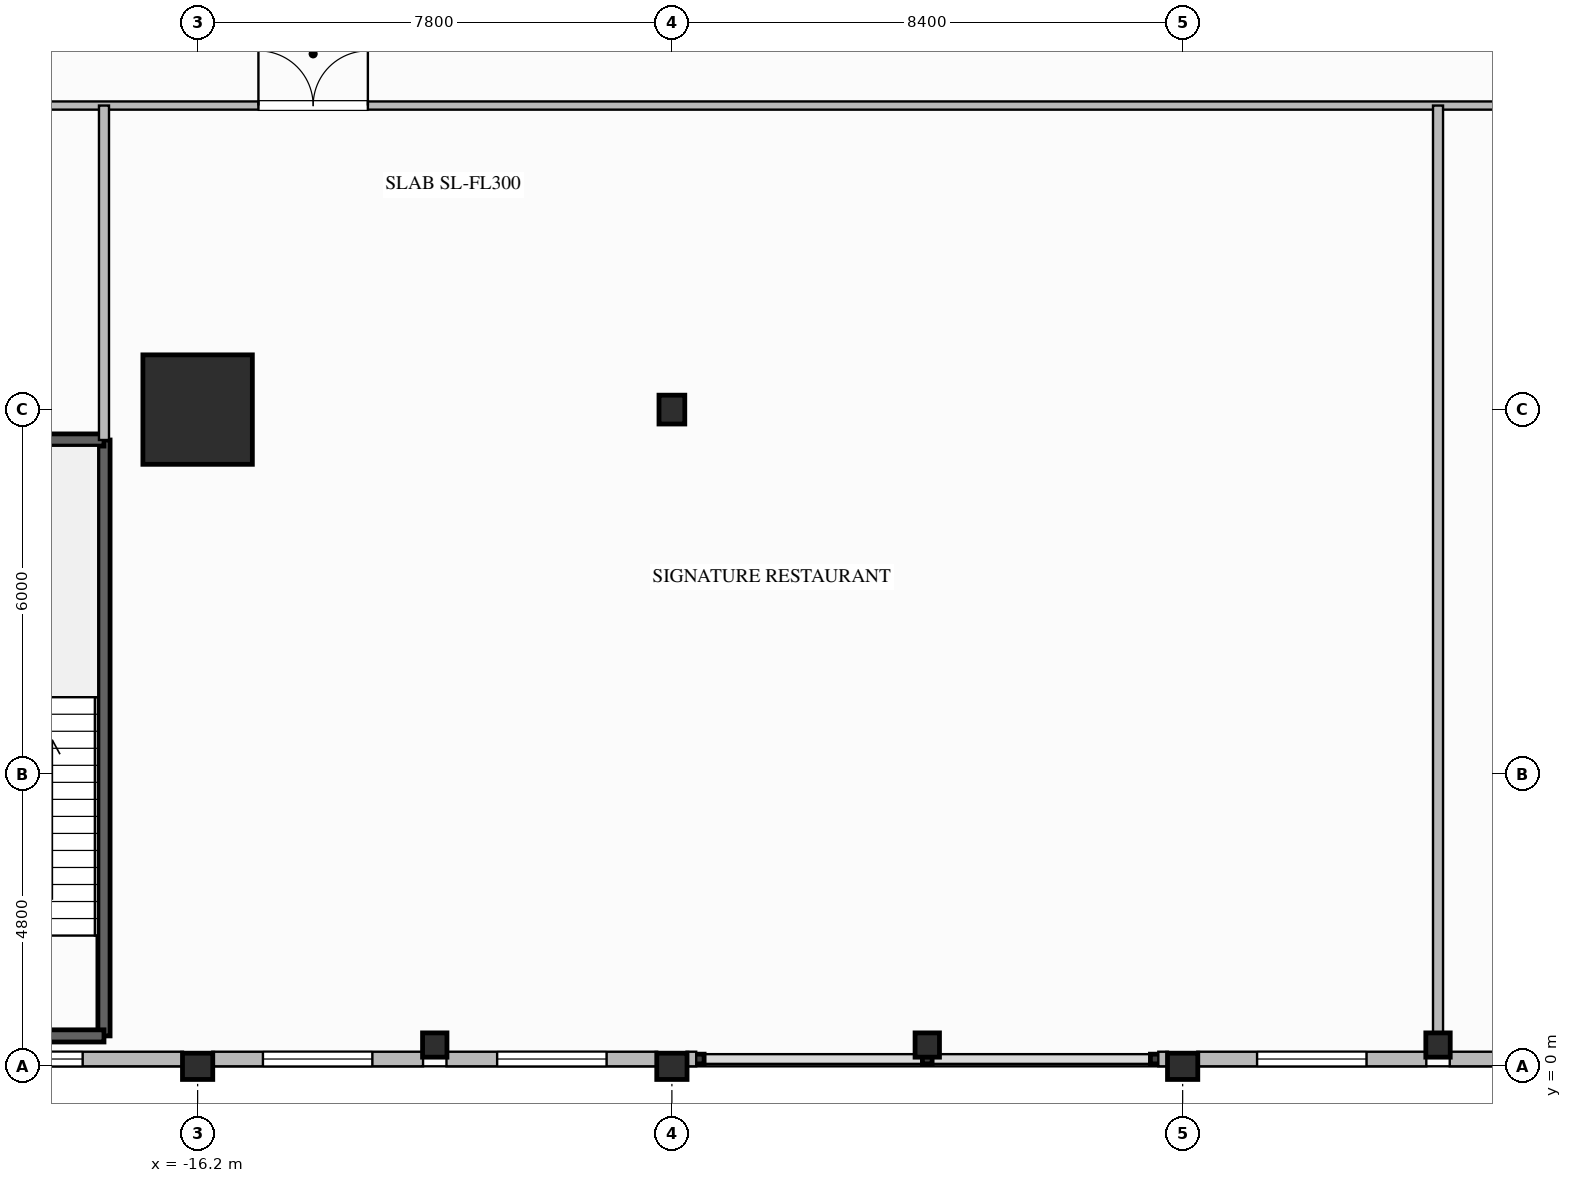
"""IFC4 building model, lengths in metres.
Left out: names, types, materials, properties, quantities, classifications, styles, units other than length and angle.
Written with IfcOpenShell. Run it as: python <this file> out.ifc"""

import sys

from ifc_helpers import new_model, si_unit, direction, frame, frame_2d, origin, origin_2d, place, context, subcontext, project, spatial, rectangle, i_section, extrude, element, fill, save


model = new_model("IFC4")
c1 = context("Model", 3, precision=1e-05, world=origin(), true_north=direction((0.0, 1.0)))
c2 = subcontext(c1, "Body", "Model", "MODEL_VIEW")
j1 = project(units=[si_unit("LENGTHUNIT", "METRE"), si_unit("PLANEANGLEUNIT", "RADIAN")], contexts=[c1])
p1 = place(None, origin())
s1 = spatial("IfcSite", under=j1, at=p1, CompositionType="ELEMENT")
p2 = place(p1, origin())
s2 = spatial("IfcBuilding", under=s1, at=p2, CompositionType="ELEMENT")
p3 = place(p2, frame((0.0, 0.0, 5.6)))
s3 = spatial("IfcBuildingStorey", under=s2, at=p3, CompositionType="ELEMENT", Elevation=5.6)
p4 = place(p3, frame((-16.2, 10.8, 0.0), z_axis=(0.0, 0.0, 1.0), x_axis=(1.0, 0.0, 0.0)))
e1 = element("IfcColumn", 1, at=p4, inside=s3, PredefinedType="COLUMN", context=c2, shape_type="SweptSolid", body=[
    extrude(rectangle(XDim=1.8, YDim=1.8, at=origin_2d()), origin(), (0.0, 0.0, 1.0), 5.2),
])
for number, where, z_axis, x_axis in (
    (2, (-16.2, 0.0, 0.0), (0.0, 0.0, 1.0), (0.0, 1.0, 0.0)),
    (3, (-8.4, 0.0, 0.0), (0.0, 0.0, 1.0), (0.0, 1.0, 0.0)),
    (4, (0.0, 0.0, 0.0), (0.0, 0.0, 1.0), (0.0, 1.0, 0.0)),
):
    element("IfcColumn", number, at=place(p3, frame(where, z_axis=z_axis, x_axis=x_axis)), inside=s3, PredefinedType="COLUMN", context=c2, shape_type="SweptSolid", body=[
        extrude(i_section(OverallWidth=0.432, OverallDepth=0.498, WebThickness=0.056, FlangeThickness=0.089, FilletRadius=0.03, at=origin_2d()), origin(), (0.0, 0.0, 1.0), 5.2),
    ])
p5 = place(p3, frame((-8.4, 10.8, 0.0), z_axis=(0.0, 0.0, 1.0), x_axis=(1.0, 0.0, 0.0)))
e5 = element("IfcColumn", 5, at=p5, inside=s3, PredefinedType="COLUMN", context=c2, shape_type="SweptSolid", body=[
    extrude(i_section(OverallWidth=0.424, OverallDepth=0.474, WebThickness=0.048, FlangeThickness=0.077, FilletRadius=0.03, at=origin_2d()), origin(), (0.0, 0.0, 1.0), 5.2),
])
for number, where, z_axis, x_axis in (
    (6, (-12.3, 0.35, 0.0), (0.0, 0.0, 1.0), (1.0, 0.0, 0.0)),
    (7, (-4.2, 0.35, 0.0), (0.0, 0.0, 1.0), (1.0, 0.0, 0.0)),
    (8, (4.2, 0.35, 0.0), (0.0, 0.0, 1.0), (1.0, 0.0, 0.0)),
):
    element("IfcColumn", number, at=place(p3, frame(where, z_axis=z_axis, x_axis=x_axis)), inside=s3, PredefinedType="COLUMN", context=c2, shape_type="SweptSolid", body=[
        extrude(i_section(OverallWidth=0.401, OverallDepth=0.399, WebThickness=0.025, FlangeThickness=0.04, FilletRadius=0.025, at=origin_2d()), origin(), (0.0, 0.0, 1.0), 5.2),
    ])
p6 = place(p3, frame((-16.441, 0.12, 0.0), z_axis=(0.0, 0.0, 1.0), x_axis=(-1.0, 0.0, 0.0)))
e9 = element("IfcWall", 9, at=p6, inside=s3, PredefinedType="STANDARD", context=c2, shape_type="SweptSolid", body=[
    extrude(rectangle(XDim=5.518, YDim=0.24, at=frame_2d((2.759, 0.0))), origin(), (0.0, 0.0, 1.0), 4.154),
])
p7 = place(p6, frame((1.65, 0.0, 0.65)))
e10 = element("IfcOpeningElement", 10, at=p7, cuts=e9, PredefinedType="OPENING", context=c2, shape_type="SweptSolid", body=[
    extrude(rectangle(XDim=1.8, YDim=2.2, at=frame_2d((0.9, 1.1))), frame((0.0, 0.13, 0.0), z_axis=(0.0, -1.0, 0.0), x_axis=(1.0, 0.0, 0.0)), (0.0, 0.0, 1.0), 0.26),
])
p8 = place(p3, frame((-12.493, 0.12, 0.0), z_axis=(0.0, 0.0, 1.0), x_axis=(-1.0, 0.0, 0.0)))
e11 = element("IfcWall", 11, at=p8, inside=s3, PredefinedType="STANDARD", context=c2, shape_type="SweptSolid", body=[
    extrude(rectangle(XDim=3.466, YDim=0.24, at=frame_2d((1.733, 0.0))), origin(), (0.0, 0.0, 1.0), 4.154),
])
p9 = place(p8, frame((0.833, 0.0, 0.65)))
e12 = element("IfcOpeningElement", 12, at=p9, cuts=e11, PredefinedType="OPENING", context=c2, shape_type="SweptSolid", body=[
    extrude(rectangle(XDim=1.8, YDim=2.2, at=frame_2d((0.9, 1.1))), frame((0.0, 0.13, 0.0), z_axis=(0.0, -1.0, 0.0), x_axis=(1.0, 0.0, 0.0)), (0.0, 0.0, 1.0), 0.26),
])
p10 = place(p3, frame((-8.641, 0.12, 0.0), z_axis=(0.0, 0.0, 1.0), x_axis=(-1.0, 0.0, 0.0)))
e13 = element("IfcWall", 13, at=p10, inside=s3, PredefinedType="STANDARD", context=c2, shape_type="SweptSolid", body=[
    extrude(rectangle(XDim=3.467, YDim=0.24, at=frame_2d((1.733, 0.0))), origin(), (0.0, 0.0, 1.0), 4.154),
])
p11 = place(p10, frame((0.833, 0.0, 0.65)))
e14 = element("IfcOpeningElement", 14, at=p11, cuts=e13, PredefinedType="OPENING", context=c2, shape_type="SweptSolid", body=[
    extrude(rectangle(XDim=1.8, YDim=2.2, at=frame_2d((0.9, 1.1))), frame((0.0, 0.13, 0.0), z_axis=(0.0, -1.0, 0.0), x_axis=(1.0, 0.0, 0.0)), (0.0, 0.0, 1.0), 0.26),
])
p12 = place(p3, frame((-8.0, 0.12, 0.0), z_axis=(0.0, 0.0, 1.0), x_axis=(-1.0, 0.0, 0.0)))
e15 = element("IfcWall", 15, at=p12, inside=s3, PredefinedType="STANDARD", context=c2, shape_type="SweptSolid", body=[
    extrude(rectangle(XDim=0.159, YDim=0.24, at=frame_2d((0.08, 0.0))), origin(), (0.0, 0.0, 1.0), 4.85),
])
p13 = place(p3, frame((-0.241, 0.12, 0.0), z_axis=(0.0, 0.0, 1.0), x_axis=(-1.0, 0.0, 0.0)))
e16 = element("IfcWall", 16, at=p13, inside=s3, PredefinedType="STANDARD", context=c2, shape_type="SweptSolid", body=[
    extrude(rectangle(XDim=0.159, YDim=0.24, at=frame_2d((0.08, 0.0))), origin(), (0.0, 0.0, 1.0), 4.85),
])
p14 = place(p3, frame((4.007, 0.12, 0.0), z_axis=(0.0, 0.0, 1.0), x_axis=(-1.0, 0.0, 0.0)))
e17 = element("IfcWall", 17, at=p14, inside=s3, PredefinedType="STANDARD", context=c2, shape_type="SweptSolid", body=[
    extrude(rectangle(XDim=3.766, YDim=0.24, at=frame_2d((1.883, 0.0))), origin(), (0.0, 0.0, 1.0), 4.154),
])
p15 = place(p14, frame((0.983, 0.0, 0.65)))
e18 = element("IfcOpeningElement", 18, at=p15, cuts=e17, PredefinedType="OPENING", context=c2, shape_type="SweptSolid", body=[
    extrude(rectangle(XDim=1.8, YDim=2.2, at=frame_2d((0.9, 1.1))), frame((0.0, 0.13, 0.0), z_axis=(0.0, -1.0, 0.0), x_axis=(1.0, 0.0, 0.0)), (0.0, 0.0, 1.0), 0.26),
])
p16 = place(p3, frame((8.159, 0.12, 0.0), z_axis=(0.0, 0.0, 1.0), x_axis=(-1.0, 0.0, 0.0)))
e19 = element("IfcWall", 19, at=p16, inside=s3, PredefinedType="STANDARD", context=c2, shape_type="SweptSolid", body=[
    extrude(rectangle(XDim=3.767, YDim=0.24, at=frame_2d((1.883, 0.0))), origin(), (0.0, 0.0, 1.0), 4.154),
])
p17 = place(p16, frame((0.983, 0.0, 0.65)))
e20 = element("IfcOpeningElement", 20, at=p17, cuts=e19, PredefinedType="OPENING", context=c2, shape_type="SweptSolid", body=[
    extrude(rectangle(XDim=1.8, YDim=2.2, at=frame_2d((0.9, 1.1))), frame((0.0, 0.13, 0.0), z_axis=(0.0, -1.0, 0.0), x_axis=(1.0, 0.0, 0.0)), (0.0, 0.0, 1.0), 0.26),
])
p18 = place(p3, frame((-17.74, 10.3, 0.0), z_axis=(0.0, 0.0, 1.0), x_axis=(0.0, -1.0, 0.0)))
e21 = element("IfcWall", 21, at=p18, inside=s3, PredefinedType="SOLIDWALL", context=c2, shape_type="SweptSolid", body=[
    extrude(rectangle(XDim=9.8, YDim=0.2, at=frame_2d((4.9, 0.0))), origin(), (0.0, 0.0, 1.0), 4.85),
])
for number, where, z_axis, x_axis in (
    (22, (-21.1, 0.5, 0.0), (0.0, 0.0, 1.0), (1.0, 0.0, 0.0)),
    (23, (-17.74, 10.3, 0.0), (0.0, 0.0, 1.0), (-1.0, 0.0, 0.0)),
):
    element("IfcWall", number, at=place(p3, frame(where, z_axis=z_axis, x_axis=x_axis)), inside=s3, PredefinedType="SOLIDWALL", context=c2, shape_type="SweptSolid", body=[
        extrude(rectangle(XDim=3.36, YDim=0.2, at=frame_2d((1.68, 0.0))), origin(), (0.0, 0.0, 1.0), 4.85),
    ])
p19 = place(p3, frame((-21.2, 15.8, 0.0), z_axis=(0.0, 0.0, 1.0), x_axis=(1.0, 0.0, 0.0)))
e24 = element("IfcWall", 24, at=p19, inside=s3, PredefinedType="PARTITIONING", context=c2, shape_type="SweptSolid", body=[
    extrude(rectangle(XDim=46.3, YDim=0.135, at=frame_2d((23.15, 0.0))), origin(), (0.0, 0.0, 1.0), 4.85),
])
p20 = place(p19, frame((6.0, 0.0, 0.0)))
e25 = element("IfcOpeningElement", 25, at=p20, cuts=e24, PredefinedType="OPENING", context=c2, shape_type="SweptSolid", body=[
    extrude(rectangle(XDim=1.8, YDim=2.35, at=frame_2d((0.9, 1.175))), frame((0.0, 0.077, 0.0), z_axis=(0.0, -1.0, 0.0), x_axis=(1.0, 0.0, 0.0)), (0.0, 0.0, 1.0), 0.155),
])
p21 = place(p19, frame((33.2, 0.0, 0.0)))
e26 = element("IfcOpeningElement", 26, at=p21, cuts=e24, PredefinedType="OPENING", context=c2, shape_type="SweptSolid", body=[
    extrude(rectangle(XDim=1.8, YDim=2.35, at=frame_2d((0.9, 1.175))), frame((0.0, 0.077, 0.0), z_axis=(0.0, -1.0, 0.0), x_axis=(1.0, 0.0, 0.0)), (0.0, 0.0, 1.0), 0.155),
])
p22 = place(p3, frame((-17.74, 10.3, 0.0), z_axis=(0.0, 0.0, 1.0), x_axis=(0.0, 1.0, 0.0)))
e27 = element("IfcWall", 27, at=p22, inside=s3, PredefinedType="PARTITIONING", context=c2, shape_type="SweptSolid", body=[
    extrude(rectangle(XDim=5.5, YDim=0.165, at=frame_2d((2.75, 0.0))), origin(), (0.0, 0.0, 1.0), 4.85),
])
p23 = place(p3, frame((4.2, 0.3, 0.0), z_axis=(0.0, 0.0, 1.0), x_axis=(0.0, 1.0, 0.0)))
e28 = element("IfcWall", 28, at=p23, inside=s3, PredefinedType="PARTITIONING", context=c2, shape_type="SweptSolid", body=[
    extrude(rectangle(XDim=15.5, YDim=0.165, at=frame_2d((7.75, 0.0))), origin(), (0.0, 0.0, 1.0), 4.85),
])
p24 = place(p7, origin())
e29 = element("IfcWindow", 29, at=p24, inside=s3, PartitioningType="SINGLE_PANEL", PredefinedType="WINDOW", context=c2, shape_type="SweptSolid", body=[
    extrude(rectangle(XDim=1.8, YDim=2.2, at=frame_2d((0.9, 1.1))), frame((0.0, 0.03, 0.0), z_axis=(0.0, -1.0, 0.0), x_axis=(1.0, 0.0, 0.0)), (0.0, 0.0, 1.0), 0.06),
])
fill(e10, e29)
p25 = place(p9, origin())
e30 = element("IfcWindow", 30, at=p25, inside=s3, PartitioningType="SINGLE_PANEL", PredefinedType="WINDOW", context=c2, shape_type="SweptSolid", body=[
    extrude(rectangle(XDim=1.8, YDim=2.2, at=frame_2d((0.9, 1.1))), frame((0.0, 0.03, 0.0), z_axis=(0.0, -1.0, 0.0), x_axis=(1.0, 0.0, 0.0)), (0.0, 0.0, 1.0), 0.06),
])
fill(e12, e30)
p26 = place(p11, origin())
e31 = element("IfcWindow", 31, at=p26, inside=s3, PartitioningType="SINGLE_PANEL", PredefinedType="WINDOW", context=c2, shape_type="SweptSolid", body=[
    extrude(rectangle(XDim=1.8, YDim=2.2, at=frame_2d((0.9, 1.1))), frame((0.0, 0.03, 0.0), z_axis=(0.0, -1.0, 0.0), x_axis=(1.0, 0.0, 0.0)), (0.0, 0.0, 1.0), 0.06),
])
fill(e14, e31)
p27 = place(p15, origin())
e32 = element("IfcWindow", 32, at=p27, inside=s3, PartitioningType="SINGLE_PANEL", PredefinedType="WINDOW", context=c2, shape_type="SweptSolid", body=[
    extrude(rectangle(XDim=1.8, YDim=2.2, at=frame_2d((0.9, 1.1))), frame((0.0, 0.03, 0.0), z_axis=(0.0, -1.0, 0.0), x_axis=(1.0, 0.0, 0.0)), (0.0, 0.0, 1.0), 0.06),
])
fill(e18, e32)
p28 = place(p20, origin())
e33 = element("IfcDoor", 33, at=p28, inside=s3, OperationType="DOUBLE_DOOR_SINGLE_SWING", PredefinedType="DOOR", context=c2, shape_type="SweptSolid", body=[
    extrude(rectangle(XDim=1.8, YDim=2.35, at=frame_2d((0.9, 1.175))), frame((0.0, 0.025, 0.0), z_axis=(0.0, -1.0, 0.0), x_axis=(1.0, 0.0, 0.0)), (0.0, 0.0, 1.0), 0.05),
])
fill(e25, e33)
save(model, sys.argv[1])
